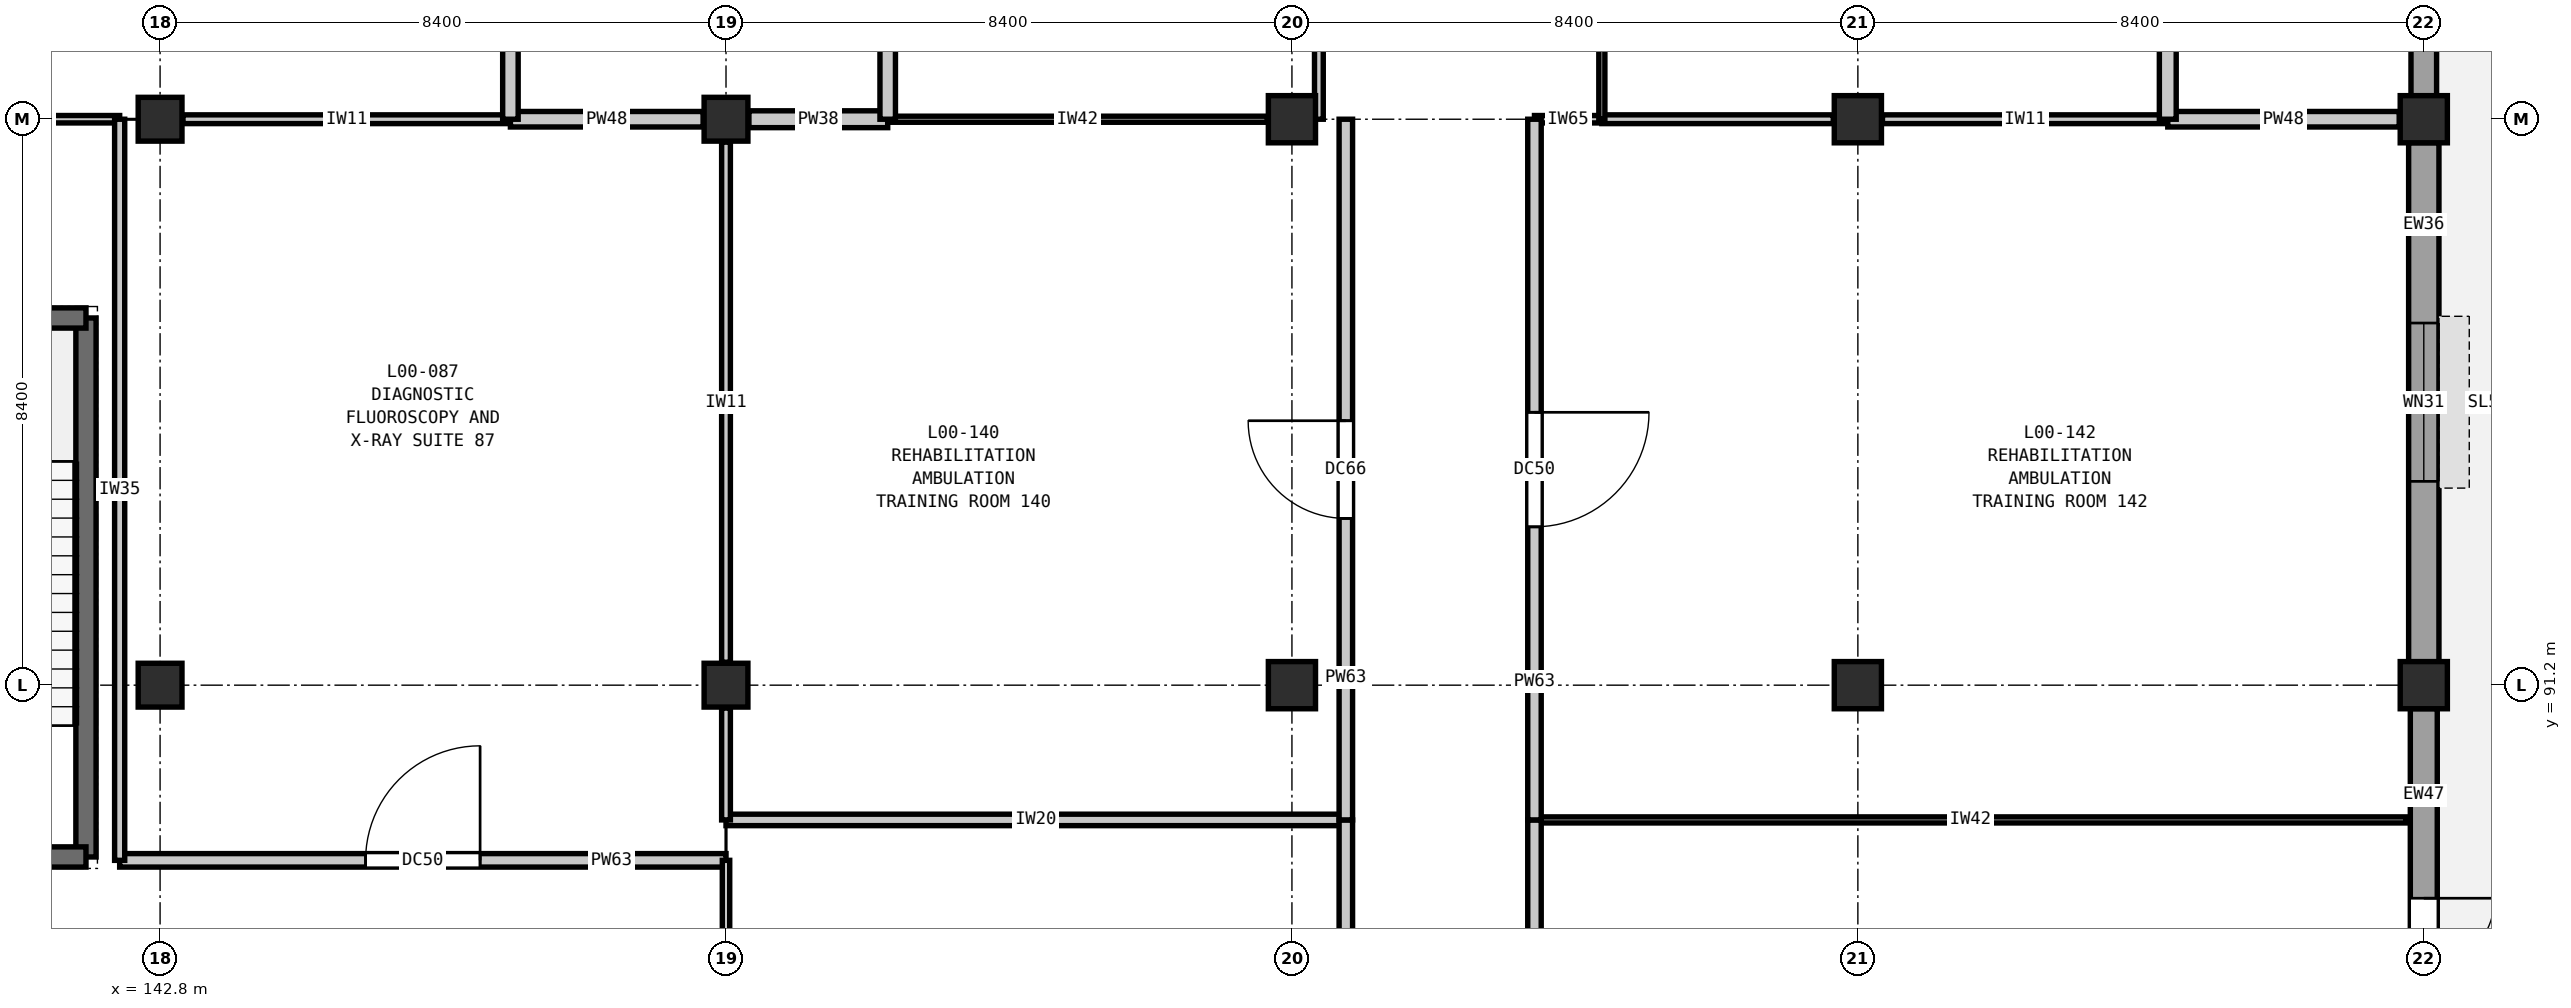
"""IFC4 building model, lengths in metres.
Left out: names, types, materials, properties, quantities, classifications, styles, units other than length and angle.
Written with IfcOpenShell. Run it as: python <this file> out.ifc"""

import sys

from ifc_helpers import new_model, si_unit, direction, frame, frame_2d, origin, origin_2d, place, context, subcontext, project, spatial, rectangle, extrude, element, fill, save


model = new_model("IFC4")
c1 = context("Model", 3, precision=1e-05, world=origin(), true_north=direction((0.0, 1.0)))
c2 = subcontext(c1, "Body", "Model", "MODEL_VIEW")
j1 = project(units=[si_unit("LENGTHUNIT", "METRE"), si_unit("PLANEANGLEUNIT", "RADIAN")], contexts=[c1])
p1 = place(None, origin())
s1 = spatial("IfcSite", under=j1, at=p1, CompositionType="ELEMENT")
p2 = place(p1, origin())
s2 = spatial("IfcBuilding", under=s1, at=p2, CompositionType="ELEMENT")
p3 = place(p2, origin())
s3 = spatial("IfcBuildingStorey", under=s2, at=p3, CompositionType="ELEMENT", Elevation=0.0)
for number, where, z_axis, x_axis in (
    (1, (142.8, 91.2, 0.0), (0.0, 0.0, 1.0), (1.0, 0.0, 0.0)),
    (2, (142.8, 99.6, 0.0), (0.0, 0.0, 1.0), (1.0, 0.0, 0.0)),
    (3, (151.2, 91.2, 0.0), (0.0, 0.0, 1.0), (1.0, 0.0, 0.0)),
    (4, (151.2, 99.6, 0.0), (0.0, 0.0, 1.0), (1.0, 0.0, 0.0)),
):
    element("IfcColumn", number, at=place(p3, frame(where, z_axis=z_axis, x_axis=x_axis)), inside=s3, PredefinedType="COLUMN", context=c2, shape_type="SweptSolid", body=[
        extrude(rectangle(XDim=0.65, YDim=0.65, at=origin_2d()), origin(), (0.0, 0.0, 1.0), 5.4),
    ])
for number, where, z_axis, x_axis in (
    (5, (159.6, 91.2, 0.0), (0.0, 0.0, 1.0), (1.0, 0.0, 0.0)),
    (6, (159.6, 99.6, 0.0), (0.0, 0.0, 1.0), (1.0, 0.0, 0.0)),
    (7, (168.0, 91.2, 0.0), (0.0, 0.0, 1.0), (1.0, 0.0, 0.0)),
    (8, (168.0, 99.6, 0.0), (0.0, 0.0, 1.0), (1.0, 0.0, 0.0)),
    (9, (176.4, 91.2, 0.0), (0.0, 0.0, 1.0), (1.0, 0.0, 0.0)),
    (10, (176.4, 99.6, 0.0), (0.0, 0.0, 1.0), (1.0, 0.0, 0.0)),
):
    element("IfcColumn", number, at=place(p3, frame(where, z_axis=z_axis, x_axis=x_axis)), inside=s3, PredefinedType="COLUMN", context=c2, shape_type="SweptSolid", body=[
        extrude(rectangle(XDim=0.7, YDim=0.7, at=origin_2d()), origin(), (0.0, 0.0, 1.0), 5.4),
    ])
p4 = place(p3, frame((176.4, 102.452, 0.0), z_axis=(0.0, 0.0, 1.0), x_axis=(0.0, -1.0, 0.0)))
e11 = element("IfcWall", 11, at=p4, inside=s3, PredefinedType="SOLIDWALL", context=c2, shape_type="SweptSolid", body=[
    extrude(rectangle(XDim=2.504, YDim=0.38, at=frame_2d((1.252, 0.0))), origin(), (0.0, 0.0, 1.0), 4.68),
])
p5 = place(p3, frame((176.4, 99.252, 0.0), z_axis=(0.0, 0.0, 1.0), x_axis=(0.0, -1.0, 0.0)))
e12 = element("IfcWall", 12, at=p5, inside=s3, PredefinedType="SOLIDWALL", context=c2, shape_type="SweptSolid", body=[
    extrude(rectangle(XDim=7.704, YDim=0.45, at=frame_2d((3.852, 0.0))), origin(), (0.0, 0.0, 1.0), 4.68),
])
p6 = place(p5, frame((2.677, 0.0, 0.9)))
e13 = element("IfcOpeningElement", 13, at=p6, cuts=e12, PredefinedType="OPENING", context=c2, shape_type="SweptSolid", body=[
    extrude(rectangle(XDim=2.35, YDim=1.75, at=frame_2d((1.175, 0.875))), frame((0.0, 0.235, 0.0), z_axis=(0.0, -1.0, 0.0), x_axis=(1.0, 0.0, 0.0)), (0.0, 0.0, 1.0), 0.47),
])
p7 = place(p3, frame((176.4, 90.852, 0.0), z_axis=(0.0, 0.0, 1.0), x_axis=(0.0, -1.0, 0.0)))
e14 = element("IfcWall", 14, at=p7, inside=s3, PredefinedType="SOLIDWALL", context=c2, shape_type="SweptSolid", body=[
    extrude(rectangle(XDim=7.729, YDim=0.4, at=frame_2d((3.865, 0.0))), origin(), (0.0, 0.0, 1.0), 4.68),
])
p8 = place(p7, frame((2.814, 0.0, 0.0)))
e15 = element("IfcOpeningElement", 15, at=p8, cuts=e14, PredefinedType="OPENING", context=c2, shape_type="SweptSolid", body=[
    extrude(rectangle(XDim=2.1, YDim=2.35, at=frame_2d((1.05, 1.175))), frame((0.0, 0.21, 0.0), z_axis=(0.0, -1.0, 0.0), x_axis=(1.0, 0.0, 0.0)), (0.0, 0.0, 1.0), 0.42),
])
p9 = place(p3, frame((141.7, 88.65, 0.0), z_axis=(0.0, 0.0, 1.0), x_axis=(0.0, 1.0, 0.0)))
e16 = element("IfcWall", 16, at=p9, inside=s3, PredefinedType="SHEAR", context=c2, shape_type="SweptSolid", body=[
    extrude(rectangle(XDim=8.0, YDim=0.3, at=frame_2d((4.0, 0.0))), origin(), (0.0, 0.0, 1.0), 5.4),
])
p10 = place(p3, frame((141.7, 96.65, 0.0), z_axis=(0.0, 0.0, 1.0), x_axis=(-1.0, 0.0, 0.0)))
e17 = element("IfcWall", 17, at=p10, inside=s3, PredefinedType="SHEAR", context=c2, shape_type="SweptSolid", body=[
    extrude(rectangle(XDim=4.1, YDim=0.3, at=frame_2d((2.05, 0.0))), origin(), (0.0, 0.0, 1.0), 5.4),
])
p11 = place(p3, frame((137.6, 88.65, 0.0), z_axis=(0.0, 0.0, 1.0), x_axis=(1.0, 0.0, 0.0)))
e18 = element("IfcWall", 18, at=p11, inside=s3, PredefinedType="SHEAR", context=c2, shape_type="SweptSolid", body=[
    extrude(rectangle(XDim=4.1, YDim=0.3, at=frame_2d((2.05, 0.0))), origin(), (0.0, 0.0, 1.0), 5.4),
])
p12 = place(p11, frame((1.3, 0.0, 0.0)))
e19 = element("IfcOpeningElement", 19, at=p12, cuts=e18, PredefinedType="OPENING", context=c2, shape_type="SweptSolid", body=[
    extrude(rectangle(XDim=1.5, YDim=2.2, at=frame_2d((0.75, 1.1))), frame((0.0, 0.16, 0.0), z_axis=(0.0, -1.0, 0.0), x_axis=(1.0, 0.0, 0.0)), (0.0, 0.0, 1.0), 0.32),
])
p13 = place(p3, frame((142.2, 88.6, 0.0), z_axis=(0.0, 0.0, 1.0), x_axis=(1.0, 0.0, 0.0)))
e20 = element("IfcWall", 20, at=p13, inside=s3, PredefinedType="PARTITIONING", context=c2, shape_type="SweptSolid", body=[
    extrude(rectangle(XDim=9.0, YDim=0.2, at=frame_2d((4.5, 0.0))), origin(), (0.0, 0.0, 1.0), 5.04),
])
p14 = place(p13, frame((3.65, 0.0, 0.0)))
e21 = element("IfcOpeningElement", 21, at=p14, cuts=e20, PredefinedType="OPENING", context=c2, shape_type="SweptSolid", body=[
    extrude(rectangle(XDim=1.7, YDim=2.3, at=frame_2d((0.85, 1.15))), frame((0.0, 0.11, 0.0), z_axis=(0.0, -1.0, 0.0), x_axis=(1.0, 0.0, 0.0)), (0.0, 0.0, 1.0), 0.22),
])
p15 = place(p3, frame((151.2, 89.2, 0.0), z_axis=(0.0, 0.0, 1.0), x_axis=(1.0, 0.0, 0.0)))
e22 = element("IfcWall", 22, at=p15, inside=s3, PredefinedType="PARTITIONING", context=c2, shape_type="SweptSolid", body=[
    extrude(rectangle(XDim=9.2, YDim=0.17, at=frame_2d((4.6, 0.0))), origin(), (0.0, 0.0, 1.0), 5.04),
])
p16 = place(p3, frame((163.2, 89.2, 0.0), z_axis=(0.0, 0.0, 1.0), x_axis=(1.0, 0.0, 0.0)))
e23 = element("IfcWall", 23, at=p16, inside=s3, PredefinedType="PARTITIONING", context=c2, shape_type="SweptSolid", body=[
    extrude(rectangle(XDim=12.94, YDim=0.09, at=frame_2d((6.47, 0.0))), origin(), (0.0, 0.0, 1.0), 5.04),
])
p17 = place(p3, frame((139.6, 99.6, 0.0), z_axis=(0.0, 0.0, 1.0), x_axis=(1.0, 0.0, 0.0)))
e24 = element("IfcWall", 24, at=p17, inside=s3, PredefinedType="PARTITIONING", context=c2, shape_type="SweptSolid", body=[
    extrude(rectangle(XDim=2.6, YDim=0.11, at=frame_2d((1.3, 0.0))), origin(), (0.0, 0.0, 1.0), 4.635),
])
p18 = place(p3, frame((143.14, 99.6, 0.0), z_axis=(0.0, 0.0, 1.0), x_axis=(1.0, 0.0, 0.0)))
e25 = element("IfcWall", 25, at=p18, inside=s3, PredefinedType="PARTITIONING", context=c2, shape_type="SweptSolid", body=[
    extrude(rectangle(XDim=4.86, YDim=0.13, at=frame_2d((2.43, 0.0))), origin(), (0.0, 0.0, 1.0), 4.635),
])
p19 = place(p3, frame((148.0, 99.6, 0.0), z_axis=(0.0, 0.0, 1.0), x_axis=(1.0, 0.0, 0.0)))
e26 = element("IfcWall", 26, at=p19, inside=s3, PredefinedType="PARTITIONING", context=c2, shape_type="SweptSolid", body=[
    extrude(rectangle(XDim=2.86, YDim=0.23, at=frame_2d((1.43, 0.0))), origin(), (0.0, 0.0, 1.0), 4.635),
])
p20 = place(p3, frame((151.54, 99.6, 0.0), z_axis=(0.0, 0.0, 1.0), x_axis=(1.0, 0.0, 0.0)))
e27 = element("IfcWall", 27, at=p20, inside=s3, PredefinedType="PARTITIONING", context=c2, shape_type="SweptSolid", body=[
    extrude(rectangle(XDim=2.06, YDim=0.25, at=frame_2d((1.03, 0.0))), origin(), (0.0, 0.0, 1.0), 4.635),
])
p21 = place(p3, frame((153.6, 99.6, 0.0), z_axis=(0.0, 0.0, 1.0), x_axis=(1.0, 0.0, 0.0)))
e28 = element("IfcWall", 28, at=p21, inside=s3, PredefinedType="PARTITIONING", context=c2, shape_type="SweptSolid", body=[
    extrude(rectangle(XDim=5.635, YDim=0.09, at=frame_2d((2.817, 0.0))), origin(), (0.0, 0.0, 1.0), 4.635),
])
p22 = place(p3, frame((163.2, 99.6, 0.0), z_axis=(0.0, 0.0, 1.0), x_axis=(1.0, 0.0, 0.0)))
e29 = element("IfcWall", 29, at=p22, inside=s3, PredefinedType="PARTITIONING", context=c2, shape_type="SweptSolid", body=[
    extrude(rectangle(XDim=1.0, YDim=0.11, at=frame_2d((0.5, 0.0))), origin(), (0.0, 0.0, 1.0), 4.635),
])
p23 = place(p3, frame((168.365, 99.6, 0.0), z_axis=(0.0, 0.0, 1.0), x_axis=(1.0, 0.0, 0.0)))
e30 = element("IfcWall", 30, at=p23, inside=s3, PredefinedType="PARTITIONING", context=c2, shape_type="SweptSolid", body=[
    extrude(rectangle(XDim=4.235, YDim=0.13, at=frame_2d((2.118, 0.0))), origin(), (0.0, 0.0, 1.0), 4.635),
])
p24 = place(p3, frame((164.2, 99.6, 0.0), z_axis=(0.0, 0.0, 1.0), x_axis=(1.0, 0.0, 0.0)))
e31 = element("IfcWall", 31, at=p24, inside=s3, PredefinedType="PARTITIONING", context=c2, shape_type="SweptSolid", body=[
    extrude(rectangle(XDim=3.435, YDim=0.13, at=frame_2d((1.718, 0.0))), origin(), (0.0, 0.0, 1.0), 4.635),
])
p25 = place(p3, frame((172.6, 99.6, 0.0), z_axis=(0.0, 0.0, 1.0), x_axis=(1.0, 0.0, 0.0)))
e32 = element("IfcWall", 32, at=p25, inside=s3, PredefinedType="PARTITIONING", context=c2, shape_type="SweptSolid", body=[
    extrude(rectangle(XDim=3.435, YDim=0.23, at=frame_2d((1.717, 0.0))), origin(), (0.0, 0.0, 1.0), 4.635),
])
p26 = place(p3, frame((142.2, 88.6, 0.0), z_axis=(0.0, 0.0, 1.0), x_axis=(0.0, 1.0, 0.0)))
e33 = element("IfcWall", 33, at=p26, inside=s3, PredefinedType="PARTITIONING", context=c2, shape_type="SweptSolid", body=[
    extrude(rectangle(XDim=11.0, YDim=0.15, at=frame_2d((5.5, 0.0))), origin(), (0.0, 0.0, 1.0), 5.04),
])
p27 = place(p3, frame((148.0, 99.6, 0.0), z_axis=(0.0, 0.0, 1.0), x_axis=(0.0, 1.0, 0.0)))
e34 = element("IfcWall", 34, at=p27, inside=s3, PredefinedType="PARTITIONING", context=c2, shape_type="SweptSolid", body=[
    extrude(rectangle(XDim=13.6, YDim=0.23, at=frame_2d((6.8, 0.0))), origin(), (0.0, 0.0, 1.0), 5.04),
])
p28 = place(p3, frame((151.2, 85.8, 0.0), z_axis=(0.0, 0.0, 1.0), x_axis=(0.0, 1.0, 0.0)))
e35 = element("IfcWall", 35, at=p28, inside=s3, PredefinedType="PARTITIONING", context=c2, shape_type="SweptSolid", body=[
    extrude(rectangle(XDim=2.8, YDim=0.11, at=frame_2d((1.4, 0.0))), origin(), (0.0, 0.0, 1.0), 4.685),
])
p29 = place(p3, frame((151.2, 91.54, 0.0), z_axis=(0.0, 0.0, 1.0), x_axis=(0.0, 1.0, 0.0)))
e36 = element("IfcWall", 36, at=p29, inside=s3, PredefinedType="PARTITIONING", context=c2, shape_type="SweptSolid", body=[
    extrude(rectangle(XDim=7.72, YDim=0.13, at=frame_2d((3.86, 0.0))), origin(), (0.0, 0.0, 1.0), 4.685),
])
p30 = place(p3, frame((151.2, 89.2, 0.0), z_axis=(0.0, 0.0, 1.0), x_axis=(0.0, 1.0, 0.0)))
e37 = element("IfcWall", 37, at=p30, inside=s3, PredefinedType="PARTITIONING", context=c2, shape_type="SweptSolid", body=[
    extrude(rectangle(XDim=1.66, YDim=0.13, at=frame_2d((0.83, 0.0))), origin(), (0.0, 0.0, 1.0), 4.685),
])
p31 = place(p3, frame((153.6, 99.6, 0.0), z_axis=(0.0, 0.0, 1.0), x_axis=(0.0, 1.0, 0.0)))
e38 = element("IfcWall", 38, at=p31, inside=s3, PredefinedType="PARTITIONING", context=c2, shape_type="SweptSolid", body=[
    extrude(rectangle(XDim=13.6, YDim=0.23, at=frame_2d((6.8, 0.0))), origin(), (0.0, 0.0, 1.0), 5.04),
])
p32 = place(p3, frame((160.0, 99.6, 0.0), z_axis=(0.0, 0.0, 1.0), x_axis=(0.0, 1.0, 0.0)))
e39 = element("IfcWall", 39, at=p32, inside=s3, PredefinedType="PARTITIONING", context=c2, shape_type="SweptSolid", body=[
    extrude(rectangle(XDim=13.6, YDim=0.13, at=frame_2d((6.8, 0.0))), origin(), (0.0, 0.0, 1.0), 5.04),
])
p33 = place(p3, frame((160.4, 82.8, 0.0), z_axis=(0.0, 0.0, 1.0), x_axis=(0.0, 1.0, 0.0)))
e40 = element("IfcWall", 40, at=p33, inside=s3, PredefinedType="PARTITIONING", context=c2, shape_type="SweptSolid", body=[
    extrude(rectangle(XDim=6.4, YDim=0.2, at=frame_2d((3.2, 0.0))), origin(), (0.0, 0.0, 1.0), 5.04),
])
p34 = place(p33, frame((2.525, 0.0, 0.0)))
e41 = element("IfcOpeningElement", 41, at=p34, cuts=e40, PredefinedType="OPENING", context=c2, shape_type="SweptSolid", body=[
    extrude(rectangle(XDim=1.35, YDim=2.2, at=frame_2d((0.675, 1.1))), frame((0.0, 0.11, 0.0), z_axis=(0.0, -1.0, 0.0), x_axis=(1.0, 0.0, 0.0)), (0.0, 0.0, 1.0), 0.22),
])
p35 = place(p3, frame((160.4, 89.2, 0.0), z_axis=(0.0, 0.0, 1.0), x_axis=(0.0, 1.0, 0.0)))
e42 = element("IfcWall", 42, at=p35, inside=s3, PredefinedType="PARTITIONING", context=c2, shape_type="SweptSolid", body=[
    extrude(rectangle(XDim=10.4, YDim=0.2, at=frame_2d((5.2, 0.0))), origin(), (0.0, 0.0, 1.0), 5.04),
])
p36 = place(p35, frame((4.475, 0.0, 0.0)))
e43 = element("IfcOpeningElement", 43, at=p36, cuts=e42, PredefinedType="OPENING", context=c2, shape_type="SweptSolid", body=[
    extrude(rectangle(XDim=1.45, YDim=2.25, at=frame_2d((0.725, 1.125))), frame((0.0, 0.11, 0.0), z_axis=(0.0, -1.0, 0.0), x_axis=(1.0, 0.0, 0.0)), (0.0, 0.0, 1.0), 0.22),
])
p37 = place(p3, frame((163.2, 82.8, 0.0), z_axis=(0.0, 0.0, 1.0), x_axis=(0.0, 1.0, 0.0)))
e44 = element("IfcWall", 44, at=p37, inside=s3, PredefinedType="PARTITIONING", context=c2, shape_type="SweptSolid", body=[
    extrude(rectangle(XDim=6.4, YDim=0.2, at=frame_2d((3.2, 0.0))), origin(), (0.0, 0.0, 1.0), 5.04),
])
p38 = place(p37, frame((2.425, 0.0, 0.0)))
e45 = element("IfcOpeningElement", 45, at=p38, cuts=e44, PredefinedType="OPENING", context=c2, shape_type="SweptSolid", body=[
    extrude(rectangle(XDim=1.55, YDim=2.25, at=frame_2d((0.775, 1.125))), frame((0.0, 0.11, 0.0), z_axis=(0.0, -1.0, 0.0), x_axis=(1.0, 0.0, 0.0)), (0.0, 0.0, 1.0), 0.22),
])
p39 = place(p3, frame((163.2, 89.2, 0.0), z_axis=(0.0, 0.0, 1.0), x_axis=(0.0, 1.0, 0.0)))
e46 = element("IfcWall", 46, at=p39, inside=s3, PredefinedType="PARTITIONING", context=c2, shape_type="SweptSolid", body=[
    extrude(rectangle(XDim=10.4, YDim=0.2, at=frame_2d((5.2, 0.0))), origin(), (0.0, 0.0, 1.0), 5.04),
])
p40 = place(p39, frame((4.35, 0.0, 0.0)))
e47 = element("IfcOpeningElement", 47, at=p40, cuts=e46, PredefinedType="OPENING", context=c2, shape_type="SweptSolid", body=[
    extrude(rectangle(XDim=1.7, YDim=2.3, at=frame_2d((0.85, 1.15))), frame((0.0, 0.11, 0.0), z_axis=(0.0, -1.0, 0.0), x_axis=(1.0, 0.0, 0.0)), (0.0, 0.0, 1.0), 0.22),
])
p41 = place(p3, frame((164.2, 99.6, 0.0), z_axis=(0.0, 0.0, 1.0), x_axis=(0.0, 1.0, 0.0)))
e48 = element("IfcWall", 48, at=p41, inside=s3, PredefinedType="PARTITIONING", context=c2, shape_type="SweptSolid", body=[
    extrude(rectangle(XDim=13.6, YDim=0.09, at=frame_2d((6.8, 0.0))), origin(), (0.0, 0.0, 1.0), 5.04),
])
p42 = place(p3, frame((172.6, 99.6, 0.0), z_axis=(0.0, 0.0, 1.0), x_axis=(0.0, 1.0, 0.0)))
e49 = element("IfcWall", 49, at=p42, inside=s3, PredefinedType="PARTITIONING", context=c2, shape_type="SweptSolid", body=[
    extrude(rectangle(XDim=13.6, YDim=0.25, at=frame_2d((6.8, 0.0))), origin(), (0.0, 0.0, 1.0), 5.04),
])
p43 = place(p6, origin())
e50 = element("IfcWindow", 50, at=p43, inside=s3, PartitioningType="DOUBLE_PANEL_VERTICAL", PredefinedType="WINDOW", context=c2, shape_type="SweptSolid", body=[
    extrude(rectangle(XDim=2.35, YDim=1.75, at=frame_2d((1.175, 0.875))), frame((0.0, 0.03, 0.0), z_axis=(0.0, -1.0, 0.0), x_axis=(1.0, 0.0, 0.0)), (0.0, 0.0, 1.0), 0.06),
])
fill(e13, e50)
p44 = place(p8, origin())
e51 = element("IfcDoor", 51, at=p44, inside=s3, OperationType="DOUBLE_DOOR_SINGLE_SWING", PredefinedType="DOOR", context=c2, shape_type="SweptSolid", body=[
    extrude(rectangle(XDim=2.1, YDim=2.35, at=frame_2d((1.05, 1.175))), frame((0.0, 0.025, 0.0), z_axis=(0.0, -1.0, 0.0), x_axis=(1.0, 0.0, 0.0)), (0.0, 0.0, 1.0), 0.05),
])
fill(e15, e51)
p45 = place(p14, origin())
e52 = element("IfcDoor", 52, at=p45, inside=s3, OperationType="SINGLE_SWING_RIGHT", PredefinedType="DOOR", context=c2, shape_type="SweptSolid", body=[
    extrude(rectangle(XDim=1.7, YDim=2.3, at=frame_2d((0.85, 1.15))), frame((0.0, 0.025, 0.0), z_axis=(0.0, -1.0, 0.0), x_axis=(1.0, 0.0, 0.0)), (0.0, 0.0, 1.0), 0.05),
])
fill(e21, e52)
p46 = place(p36, origin())
e53 = element("IfcDoor", 53, at=p46, inside=s3, OperationType="SINGLE_SWING_RIGHT", PredefinedType="DOOR", context=c2, shape_type="SweptSolid", body=[
    extrude(rectangle(XDim=1.45, YDim=2.25, at=frame_2d((0.725, 1.125))), frame((0.0, 0.025, 0.0), z_axis=(0.0, -1.0, 0.0), x_axis=(1.0, 0.0, 0.0)), (0.0, 0.0, 1.0), 0.05),
])
fill(e43, e53)
p47 = place(p40, frame((1.7, 0.0, 0.0), z_axis=(0.0, 0.0, 1.0), x_axis=(-1.0, 0.0, 0.0)))
e54 = element("IfcDoor", 54, at=p47, inside=s3, OperationType="SINGLE_SWING_LEFT", PredefinedType="DOOR", context=c2, shape_type="SweptSolid", body=[
    extrude(rectangle(XDim=1.7, YDim=2.3, at=frame_2d((0.85, 1.15))), frame((0.0, 0.025, 0.0), z_axis=(0.0, -1.0, 0.0), x_axis=(1.0, 0.0, 0.0)), (0.0, 0.0, 1.0), 0.05),
])
fill(e47, e54)
save(model, sys.argv[1])
